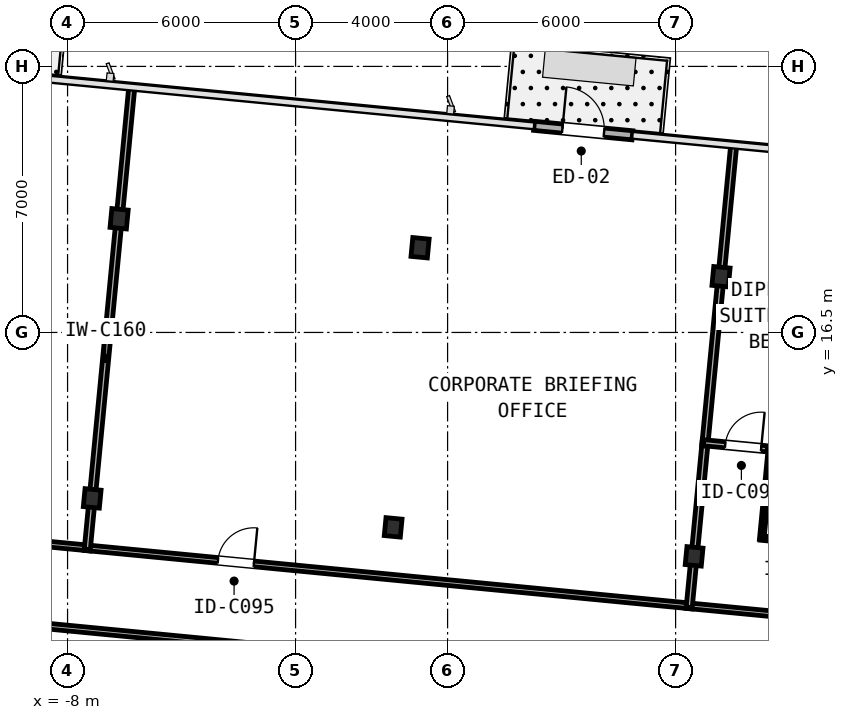
"""IFC4 building model, lengths in metres.
Left out: names, types, materials, properties, quantities, classifications, styles, units other than length and angle.
Written with IfcOpenShell. Run it as: python <this file> out.ifc"""

import sys

from ifc_helpers import new_model, si_unit, direction, frame, frame_2d, origin, origin_2d, place, context, subcontext, project, spatial, rectangle, i_section, extrude, element, fill, save


model = new_model("IFC4")
c1 = context("Model", 3, precision=1e-05, world=origin(), true_north=direction((0.0, 1.0)))
c2 = subcontext(c1, "Body", "Model", "MODEL_VIEW")
j1 = project(units=[si_unit("LENGTHUNIT", "METRE"), si_unit("PLANEANGLEUNIT", "RADIAN")], contexts=[c1])
p1 = place(None, origin())
s1 = spatial("IfcSite", under=j1, at=p1, CompositionType="ELEMENT")
p2 = place(p1, origin())
s2 = spatial("IfcBuilding", under=s1, at=p2, CompositionType="ELEMENT")
p3 = place(p2, frame((0.0, 0.0, 166.95)))
s3 = spatial("IfcBuildingStorey", under=s2, at=p3, CompositionType="ELEMENT", Elevation=166.95)
p4 = place(p3, frame((-7.352, 12.134, 0.0), z_axis=(0.0, 0.0, 1.0), x_axis=(0.995396198367, -0.09584575252, 0.0)))
e1 = element("IfcColumn", 1, at=p4, inside=s3, PredefinedType="COLUMN", context=c2, shape_type="SweptSolid", body=[
    extrude(i_section(OverallWidth=0.424, OverallDepth=0.474, WebThickness=0.048, FlangeThickness=0.077, FilletRadius=0.031, at=origin_2d()), origin(), (0.0, 0.0, 1.0), 3.45),
])
p5 = place(p3, frame((-6.643, 19.492, 0.0), z_axis=(0.0, 0.0, 1.0), x_axis=(0.995396198367, -0.09584575252, 0.0)))
e2 = element("IfcColumn", 2, at=p5, inside=s3, PredefinedType="COLUMN", context=c2, shape_type="SweptSolid", body=[
    extrude(i_section(OverallWidth=0.432, OverallDepth=0.498, WebThickness=0.056, FlangeThickness=0.089, FilletRadius=0.031, at=origin_2d()), origin(), (0.0, 0.0, 1.0), 3.45),
])
p6 = place(p3, frame((0.568, 11.371, 0.0), z_axis=(0.0, 0.0, 1.0), x_axis=(0.995396198367, -0.09584575252, 0.0)))
e3 = element("IfcColumn", 3, at=p6, inside=s3, PredefinedType="COLUMN", context=c2, shape_type="SweptSolid", body=[
    extrude(i_section(OverallWidth=0.424, OverallDepth=0.474, WebThickness=0.048, FlangeThickness=0.077, FilletRadius=0.031, at=origin_2d()), origin(), (0.0, 0.0, 1.0), 3.45),
])
p7 = place(p3, frame((1.276, 18.729, 0.0), z_axis=(0.0, 0.0, 1.0), x_axis=(0.995396198367, -0.09584575252, 0.0)))
e4 = element("IfcColumn", 4, at=p7, inside=s3, PredefinedType="COLUMN", context=c2, shape_type="SweptSolid", body=[
    extrude(i_section(OverallWidth=0.432, OverallDepth=0.498, WebThickness=0.056, FlangeThickness=0.089, FilletRadius=0.031, at=origin_2d()), origin(), (0.0, 0.0, 1.0), 3.45),
])
p8 = place(p3, frame((8.487, 10.609, 0.0), z_axis=(0.0, 0.0, 1.0), x_axis=(0.995396198367, -0.09584575252, 0.0)))
e5 = element("IfcColumn", 5, at=p8, inside=s3, PredefinedType="COLUMN", context=c2, shape_type="SweptSolid", body=[
    extrude(i_section(OverallWidth=0.424, OverallDepth=0.474, WebThickness=0.048, FlangeThickness=0.077, FilletRadius=0.031, at=origin_2d()), origin(), (0.0, 0.0, 1.0), 3.45),
])
p9 = place(p3, frame((9.195, 17.967, 0.0), z_axis=(0.0, 0.0, 1.0), x_axis=(0.995396198367, -0.09584575252, 0.0)))
e6 = element("IfcColumn", 6, at=p9, inside=s3, PredefinedType="COLUMN", context=c2, shape_type="SweptSolid", body=[
    extrude(i_section(OverallWidth=0.432, OverallDepth=0.498, WebThickness=0.056, FlangeThickness=0.089, FilletRadius=0.031, at=origin_2d()), origin(), (0.0, 0.0, 1.0), 3.45),
])
p10 = place(p3, frame((4.275, 21.937, 0.0), z_axis=(0.0, 0.0, 1.0), x_axis=(0.995394049959, -0.095868061976, 0.0)))
e7 = element("IfcWall", 7, at=p10, inside=s3, PredefinedType="STANDARD", context=c2, shape_type="SweptSolid", body=[
    extrude(rectangle(XDim=2.6, YDim=0.24, at=frame_2d((1.3, 0.0))), origin(), (0.0, 0.0, 1.0), 3.19),
])
p11 = place(p10, frame((0.75, 0.0, 0.0)))
e8 = element("IfcOpeningElement", 8, at=p11, cuts=e7, PredefinedType="OPENING", context=c2, shape_type="SweptSolid", body=[
    extrude(rectangle(XDim=1.1, YDim=2.15, at=frame_2d((0.55, 1.075))), frame((0.0, 0.13, 0.0), z_axis=(0.0, -1.0, 0.0), x_axis=(1.0, 0.0, 0.0)), (0.0, 0.0, 1.0), 0.26),
])
p12 = place(p3, frame((-19.02, 11.943, 0.0), z_axis=(0.0, 0.0, 1.0), x_axis=(0.995395421372, -0.095853821582, 0.0)))
e9 = element("IfcWall", 9, at=p12, inside=s3, PredefinedType="PARTITIONING", context=c2, shape_type="SweptSolid", body=[
    extrude(rectangle(XDim=11.678, YDim=0.15, at=frame_2d((5.839, 0.0))), origin(), (0.0, 0.0, 1.0), 2.479),
])
p13 = place(p12, frame((7.312, 0.0, 0.0)))
e10 = element("IfcOpeningElement", 10, at=p13, cuts=e9, PredefinedType="OPENING", context=c2, shape_type="SweptSolid", body=[
    extrude(rectangle(XDim=0.95, YDim=2.15, at=frame_2d((0.475, 1.075))), frame((0.0, 0.085, 0.0), z_axis=(0.0, -1.0, 0.0), x_axis=(1.0, 0.0, 0.0)), (0.0, 0.0, 1.0), 0.17),
])
p14 = place(p3, frame((-7.559, 10.84, 0.0), z_axis=(0.0, 0.0, 1.0), x_axis=(0.995396443768, -0.095843203903, 0.0)))
e11 = element("IfcWall", 11, at=p14, inside=s3, PredefinedType="PARTITIONING", context=c2, shape_type="SweptSolid", body=[
    extrude(rectangle(XDim=16.076, YDim=0.15, at=frame_2d((8.038, 0.0))), origin(), (0.0, 0.0, 1.0), 2.479),
])
p15 = place(p14, frame((3.532, 0.0, 0.0)))
e12 = element("IfcOpeningElement", 12, at=p15, cuts=e11, PredefinedType="OPENING", context=c2, shape_type="SweptSolid", body=[
    extrude(rectangle(XDim=0.95, YDim=2.15, at=frame_2d((0.475, 1.075))), frame((0.0, 0.085, 0.0), z_axis=(0.0, -1.0, 0.0), x_axis=(1.0, 0.0, 0.0)), (0.0, 0.0, 1.0), 0.17),
])
p16 = place(p3, frame((8.28, 9.314, 0.0), z_axis=(0.0, 0.0, 1.0), x_axis=(0.995395467524, -0.095853342309, 0.0)))
e13 = element("IfcWall", 13, at=p16, inside=s3, PredefinedType="PARTITIONING", context=c2, shape_type="SweptSolid", body=[
    extrude(rectangle(XDim=8.12, YDim=0.15, at=frame_2d((4.06, 0.0))), origin(), (0.0, 0.0, 1.0), 2.479),
])
p17 = place(p16, frame((3.585, 0.0, 0.0)))
e14 = element("IfcOpeningElement", 14, at=p17, cuts=e13, PredefinedType="OPENING", context=c2, shape_type="SweptSolid", body=[
    extrude(rectangle(XDim=0.95, YDim=2.15, at=frame_2d((0.475, 1.075))), frame((0.0, 0.085, 0.0), z_axis=(0.0, -1.0, 0.0), x_axis=(1.0, 0.0, 0.0)), (0.0, 0.0, 1.0), 0.17),
])
p18 = place(p3, frame((3.121, 7.651, 0.0), z_axis=(0.0, 0.0, 1.0), x_axis=(-0.995397135603, 0.095836018457, 0.0)))
e15 = element("IfcWall", 15, at=p18, inside=s3, PredefinedType="PARTITIONING", context=c2, shape_type="SweptSolid", body=[
    extrude(rectangle(XDim=18.892, YDim=0.15, at=frame_2d((9.446, 0.0))), origin(), (0.0, 0.0, 1.0), 2.479),
])
p19 = place(p18, frame((14.502, 0.0, 0.0)))
e16 = element("IfcOpeningElement", 16, at=p19, cuts=e15, PredefinedType="OPENING", context=c2, shape_type="SweptSolid", body=[
    extrude(rectangle(XDim=0.95, YDim=2.15, at=frame_2d((0.475, 1.075))), frame((0.0, 0.085, 0.0), z_axis=(0.0, -1.0, 0.0), x_axis=(1.0, 0.0, 0.0)), (0.0, 0.0, 1.0), 0.17),
])
p20 = place(p3, frame((-7.369, 11.958, 0.0), z_axis=(0.0, 0.0, 1.0), x_axis=(-0.095831494917, -0.995397571115, 0.0)))
e17 = element("IfcWall", 17, at=p20, inside=s3, PredefinedType="PARTITIONING", context=c2, shape_type="SweptSolid", body=[
    extrude(rectangle(XDim=1.172, YDim=0.16, at=frame_2d((0.586, 0.0))), origin(), (0.0, 0.0, 1.0), 2.479),
])
p21 = place(p3, frame((-6.66, 19.316, 0.0), z_axis=(0.0, 0.0, 1.0), x_axis=(-0.095853155488, -0.995395485515, 0.0)))
e18 = element("IfcWall", 18, at=p21, inside=s3, PredefinedType="PARTITIONING", context=c2, shape_type="SweptSolid", body=[
    extrude(rectangle(XDim=7.04, YDim=0.16, at=frame_2d((3.52, 0.0))), origin(), (0.0, 0.0, 1.0), 2.479),
])
p22 = place(p3, frame((-6.306, 22.995, 0.0), z_axis=(0.0, 0.0, 1.0), x_axis=(-0.095859866796, -0.995394839216, 0.0)))
e19 = element("IfcWall", 19, at=p22, inside=s3, PredefinedType="PARTITIONING", context=c2, shape_type="SweptSolid", body=[
    extrude(rectangle(XDim=3.344, YDim=0.16, at=frame_2d((1.672, 0.0))), origin(), (0.0, 0.0, 1.0), 3.19),
])
p23 = place(p3, frame((8.47, 10.433, 0.0), z_axis=(0.0, 0.0, 1.0), x_axis=(-0.095831494917, -0.995397571115, 0.0)))
e20 = element("IfcWall", 20, at=p23, inside=s3, PredefinedType="PARTITIONING", context=c2, shape_type="SweptSolid", body=[
    extrude(rectangle(XDim=1.172, YDim=0.16, at=frame_2d((0.586, 0.0))), origin(), (0.0, 0.0, 1.0), 2.479),
])
p24 = place(p3, frame((8.782, 13.677, 0.0), z_axis=(0.0, 0.0, 1.0), x_axis=(-0.095851667856, -0.995395628767, 0.0)))
e21 = element("IfcWall", 21, at=p24, inside=s3, PredefinedType="PARTITIONING", context=c2, shape_type="SweptSolid", body=[
    extrude(rectangle(XDim=2.906, YDim=0.16, at=frame_2d((1.453, 0.0))), origin(), (0.0, 0.0, 1.0), 2.479),
])
p25 = place(p3, frame((9.178, 17.791, 0.0), z_axis=(0.0, 0.0, 1.0), x_axis=(-0.095830387623, -0.995397677719, 0.0)))
e22 = element("IfcWall", 22, at=p25, inside=s3, PredefinedType="PARTITIONING", context=c2, shape_type="SweptSolid", body=[
    extrude(rectangle(XDim=4.298, YDim=0.16, at=frame_2d((2.149, 0.0))), origin(), (0.0, 0.0, 1.0), 2.479),
])
p26 = place(p3, frame((9.533, 21.47, 0.0), z_axis=(0.0, 0.0, 1.0), x_axis=(-0.095859866796, -0.995394839216, 0.0)))
e23 = element("IfcWall", 23, at=p26, inside=s3, PredefinedType="PARTITIONING", context=c2, shape_type="SweptSolid", body=[
    extrude(rectangle(XDim=3.344, YDim=0.16, at=frame_2d((1.672, 0.0))), origin(), (0.0, 0.0, 1.0), 3.19),
])
p27 = place(p3, frame((8.735, 13.599, 0.0), z_axis=(0.0, 0.0, 1.0), x_axis=(0.995394173932, -0.095866774755, 0.0)))
e24 = element("IfcWall", 24, at=p27, inside=s3, PredefinedType="PARTITIONING", context=c2, shape_type="SweptSolid", body=[
    extrude(rectangle(XDim=1.808, YDim=0.16, at=frame_2d((0.904, 0.0))), origin(), (0.0, 0.0, 1.0), 2.479),
])
p28 = place(p27, frame((0.574, 0.0, 0.0)))
e25 = element("IfcOpeningElement", 25, at=p28, cuts=e24, PredefinedType="OPENING", context=c2, shape_type="SweptSolid", body=[
    extrude(rectangle(XDim=0.95, YDim=2.15, at=frame_2d((0.475, 1.075))), frame((0.0, 0.09, 0.0), z_axis=(0.0, -1.0, 0.0), x_axis=(1.0, 0.0, 0.0)), (0.0, 0.0, 1.0), 0.18),
])
p29 = place(p3, frame((10.498, 13.469, 0.0), z_axis=(0.0, 0.0, 1.0), x_axis=(-0.095842578202, -0.995396504014, 0.0)))
e26 = element("IfcWall", 26, at=p29, inside=s3, PredefinedType="PARTITIONING", context=c2, shape_type="SweptSolid", body=[
    extrude(rectangle(XDim=2.43, YDim=0.12, at=frame_2d((1.215, 0.0))), origin(), (0.0, 0.0, 1.0), 3.19),
])
p30 = place(p3, frame((10.229, 11.094, 0.0), z_axis=(0.0, 0.0, 1.0), x_axis=(0.995403652262, -0.095768309281, 0.0)))
e27 = element("IfcWall", 27, at=p30, inside=s3, PredefinedType="PARTITIONING", context=c2, shape_type="SweptSolid", body=[
    extrude(rectangle(XDim=2.33, YDim=0.12, at=frame_2d((1.165, 0.0))), origin(), (0.0, 0.0, 1.0), 2.718),
])
p31 = place(p3, frame((12.774, 13.21, 0.0), z_axis=(0.0, 0.0, 1.0), x_axis=(-0.995398273854, 0.095824195322, 0.0)))
e28 = element("IfcWall", 28, at=p31, inside=s3, PredefinedType="PARTITIONING", context=c2, shape_type="SweptSolid", body=[
    extrude(rectangle(XDim=2.372, YDim=0.12, at=frame_2d((1.186, 0.0))), origin(), (0.0, 0.0, 1.0), 2.718),
])
p32 = place(p31, frame((0.28, 0.0, 0.0)))
e29 = element("IfcOpeningElement", 29, at=p32, cuts=e28, PredefinedType="OPENING", context=c2, shape_type="SweptSolid", body=[
    extrude(rectangle(XDim=0.85, YDim=2.1, at=frame_2d((0.425, 1.05))), frame((0.0, 0.07, 0.0), z_axis=(0.0, -1.0, 0.0), x_axis=(1.0, 0.0, 0.0)), (0.0, 0.0, 1.0), 0.14),
])
p33 = place(p11, origin())
e30 = element("IfcDoor", 30, at=p33, inside=s3, OperationType="SINGLE_SWING_LEFT", PredefinedType="DOOR", context=c2, shape_type="SweptSolid", body=[
    extrude(rectangle(XDim=1.1, YDim=2.15, at=frame_2d((0.55, 1.075))), frame((0.0, 0.025, 0.0), z_axis=(0.0, -1.0, 0.0), x_axis=(1.0, 0.0, 0.0)), (0.0, 0.0, 1.0), 0.05),
])
fill(e8, e30)
p34 = place(p15, frame((0.95, 0.0, 0.0), z_axis=(0.0, 0.0, 1.0), x_axis=(-1.0, 0.0, 0.0)))
e31 = element("IfcDoor", 31, at=p34, inside=s3, OperationType="SINGLE_SWING_RIGHT", PredefinedType="DOOR", context=c2, shape_type="SweptSolid", body=[
    extrude(rectangle(XDim=0.95, YDim=2.15, at=frame_2d((0.475, 1.075))), frame((0.0, 0.025, 0.0), z_axis=(0.0, -1.0, 0.0), x_axis=(1.0, 0.0, 0.0)), (0.0, 0.0, 1.0), 0.05),
])
fill(e12, e31)
p35 = place(p28, origin())
e32 = element("IfcDoor", 32, at=p35, inside=s3, OperationType="SINGLE_SWING_RIGHT", PredefinedType="DOOR", context=c2, shape_type="SweptSolid", body=[
    extrude(rectangle(XDim=0.95, YDim=2.15, at=frame_2d((0.475, 1.075))), frame((0.0, 0.025, 0.0), z_axis=(0.0, -1.0, 0.0), x_axis=(1.0, 0.0, 0.0)), (0.0, 0.0, 1.0), 0.05),
])
fill(e25, e32)
save(model, sys.argv[1])
